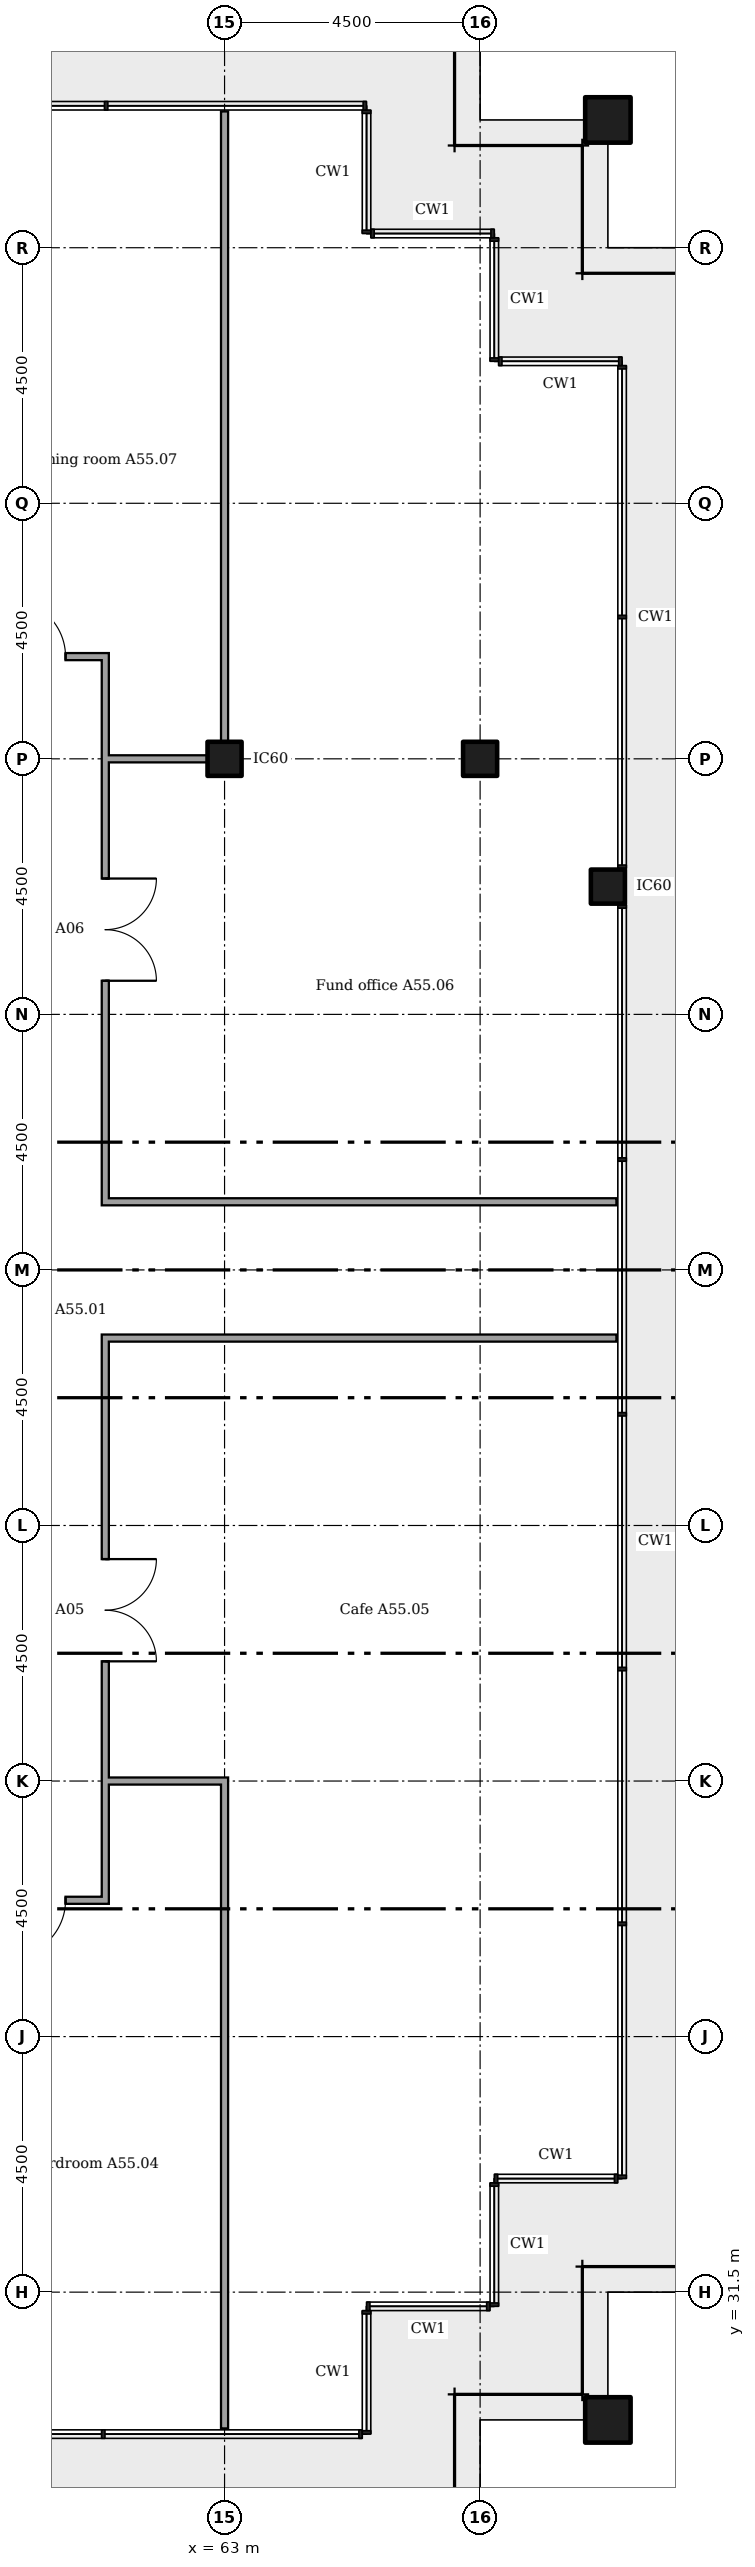
"""IFC4 building model, lengths in metres.
Left out: names, types, materials, properties, quantities, classifications, styles, units other than length and angle.
Written with IfcOpenShell. Run it as: python <this file> out.ifc"""

import sys

from ifc_helpers import new_model, si_unit, direction, frame, frame_2d, origin, origin_2d, place, context, subcontext, project, spatial, rectangle, extrude, element, fill, save


model = new_model("IFC4")
c1 = context("Model", 3, precision=1e-05, world=origin(), true_north=direction((0.0, 1.0)))
c2 = subcontext(c1, "Body", "Model", "MODEL_VIEW")
j1 = project(units=[si_unit("LENGTHUNIT", "METRE"), si_unit("PLANEANGLEUNIT", "RADIAN")], contexts=[c1])
p1 = place(None, origin())
s1 = spatial("IfcSite", under=j1, at=p1, CompositionType="ELEMENT")
p2 = place(p1, origin())
s2 = spatial("IfcBuilding", under=s1, at=p2, CompositionType="ELEMENT")
p3 = place(p2, frame((0.0, 0.0, 217.2)))
s3 = spatial("IfcBuildingStorey", under=s2, at=p3, CompositionType="ELEMENT", Elevation=217.2)
for number, where in (
    (1, (69.75, 29.25, 0.0)),
    (2, (69.75, 69.75, 0.0)),
):
    element("IfcColumn", number, at=place(p3, frame(where)), inside=s3, PredefinedType="COLUMN", context=c2, shape_type="SweptSolid", body=[
        extrude(rectangle(XDim=0.8, YDim=0.8, at=origin_2d()), origin(), (0.0, 0.0, 1.0), 3.6),
    ])
for number, where in (
    (3, (63.0, 58.5, 0.0)),
    (4, (67.5, 58.5, 0.0)),
    (5, (69.75, 56.25, 0.0)),
):
    element("IfcColumn", number, at=place(p3, frame(where)), inside=s3, PredefinedType="COLUMN", context=c2, shape_type="SweptSolid", body=[
        extrude(rectangle(XDim=0.6, YDim=0.6, at=origin_2d()), origin(), (0.0, 0.0, 1.0), 3.6),
    ])
p4 = place(p3, frame((42.5, 38.4, 0.0)))
e6 = element("IfcWall", 6, at=p4, inside=s3, PredefinedType="PARTITIONING", context=c2, shape_type="SweptSolid", body=[
    extrude(rectangle(XDim=18.462, YDim=0.125, at=frame_2d((9.231, 0.0))), origin(), (0.0, 0.0, 1.0), 3.45),
])
p5 = place(p4, frame((0.35, 0.0, 0.0)))
e7 = element("IfcOpeningElement", 7, at=p5, cuts=e6, PredefinedType="OPENING", context=c2, shape_type="SweptSolid", body=[
    extrude(rectangle(XDim=1.8, YDim=2.1, at=frame_2d((0.9, 1.05))), frame((0.0, 0.073, 0.0), z_axis=(0.0, -1.0, 0.0), x_axis=(1.0, 0.0, 0.0)), (0.0, 0.0, 1.0), 0.145),
])
p6 = place(p4, frame((5.258, 0.0, 0.0)))
e8 = element("IfcOpeningElement", 8, at=p6, cuts=e6, PredefinedType="OPENING", context=c2, shape_type="SweptSolid", body=[
    extrude(rectangle(XDim=1.0, YDim=2.1, at=frame_2d((0.5, 1.05))), frame((0.0, 0.073, 0.0), z_axis=(0.0, -1.0, 0.0), x_axis=(1.0, 0.0, 0.0)), (0.0, 0.0, 1.0), 0.145),
])
p7 = place(p4, frame((13.705, 0.0, 0.0)))
e9 = element("IfcOpeningElement", 9, at=p7, cuts=e6, PredefinedType="OPENING", context=c2, shape_type="SweptSolid", body=[
    extrude(rectangle(XDim=1.0, YDim=2.1, at=frame_2d((0.5, 1.05))), frame((0.0, 0.073, 0.0), z_axis=(0.0, -1.0, 0.0), x_axis=(1.0, 0.0, 0.0)), (0.0, 0.0, 1.0), 0.145),
])
p8 = place(p4, frame((16.7, 0.0, 0.0)))
e10 = element("IfcOpeningElement", 10, at=p8, cuts=e6, PredefinedType="OPENING", context=c2, shape_type="SweptSolid", body=[
    extrude(rectangle(XDim=1.0, YDim=2.1, at=frame_2d((0.5, 1.05))), frame((0.0, 0.073, 0.0), z_axis=(0.0, -1.0, 0.0), x_axis=(1.0, 0.0, 0.0)), (0.0, 0.0, 1.0), 0.145),
])
p9 = place(p3, frame((60.9, 40.5, 0.0)))
e11 = element("IfcWall", 11, at=p9, inside=s3, PredefinedType="PARTITIONING", context=c2, shape_type="SweptSolid", body=[
    extrude(rectangle(XDim=2.163, YDim=0.125, at=frame_2d((1.081, 0.0))), origin(), (0.0, 0.0, 1.0), 2.772),
])
for number, where in (
    (12, (60.837, 48.3, 0.0)),
    (13, (60.837, 50.7, 0.0)),
):
    element("IfcWall", number, at=place(p3, frame(where)), inside=s3, PredefinedType="PARTITIONING", context=c2, shape_type="SweptSolid", body=[
        extrude(rectangle(XDim=9.062, YDim=0.125, at=frame_2d((4.531, 0.0))), origin(), (0.0, 0.0, 1.0), 3.45),
    ])
p10 = place(p3, frame((60.9, 58.5, 0.0)))
e14 = element("IfcWall", 14, at=p10, inside=s3, PredefinedType="PARTITIONING", context=c2, shape_type="SweptSolid", body=[
    extrude(rectangle(XDim=2.163, YDim=0.125, at=frame_2d((1.081, 0.0))), origin(), (0.0, 0.0, 1.0), 2.676),
])
p11 = place(p3, frame((42.6, 60.3, 0.0)))
e15 = element("IfcWall", 15, at=p11, inside=s3, PredefinedType="PARTITIONING", context=c2, shape_type="SweptSolid", body=[
    extrude(rectangle(XDim=18.362, YDim=0.125, at=frame_2d((9.181, 0.0))), origin(), (0.0, 0.0, 1.0), 3.45),
])
p12 = place(p11, frame((16.6, 0.0, 0.0)))
e16 = element("IfcOpeningElement", 16, at=p12, cuts=e15, PredefinedType="OPENING", context=c2, shape_type="SweptSolid", body=[
    extrude(rectangle(XDim=1.0, YDim=2.1, at=frame_2d((0.5, 1.05))), frame((0.0, 0.073, 0.0), z_axis=(0.0, -1.0, 0.0), x_axis=(1.0, 0.0, 0.0)), (0.0, 0.0, 1.0), 0.145),
])
p13 = place(p11, frame((12.695, 0.0, 0.0)))
e17 = element("IfcOpeningElement", 17, at=p13, cuts=e15, PredefinedType="OPENING", context=c2, shape_type="SweptSolid", body=[
    extrude(rectangle(XDim=1.0, YDim=2.1, at=frame_2d((0.5, 1.05))), frame((0.0, 0.073, 0.0), z_axis=(0.0, -1.0, 0.0), x_axis=(1.0, 0.0, 0.0)), (0.0, 0.0, 1.0), 0.145),
])
p14 = place(p11, frame((9.105, 0.0, 0.0)))
e18 = element("IfcOpeningElement", 18, at=p14, cuts=e15, PredefinedType="OPENING", context=c2, shape_type="SweptSolid", body=[
    extrude(rectangle(XDim=1.0, YDim=2.1, at=frame_2d((0.5, 1.05))), frame((0.0, 0.073, 0.0), z_axis=(0.0, -1.0, 0.0), x_axis=(1.0, 0.0, 0.0)), (0.0, 0.0, 1.0), 0.145),
])
p15 = place(p11, frame((2.95, 0.0, 0.0)))
e19 = element("IfcOpeningElement", 19, at=p15, cuts=e15, PredefinedType="OPENING", context=c2, shape_type="SweptSolid", body=[
    extrude(rectangle(XDim=1.0, YDim=2.1, at=frame_2d((0.5, 1.05))), frame((0.0, 0.073, 0.0), z_axis=(0.0, -1.0, 0.0), x_axis=(1.0, 0.0, 0.0)), (0.0, 0.0, 1.0), 0.145),
])
p16 = place(p3, frame((60.9, 38.462, 0.0), z_axis=(0.0, 0.0, 1.0), x_axis=(0.0, 1.0, 0.0)))
e20 = element("IfcWall", 20, at=p16, inside=s3, PredefinedType="PARTITIONING", context=c2, shape_type="SweptSolid", body=[
    extrude(rectangle(XDim=9.775, YDim=0.125, at=frame_2d((4.888, 0.0))), origin(), (0.0, 0.0, 1.0), 3.45),
])
p17 = place(p16, frame((4.146, 0.0, 0.0)))
e21 = element("IfcOpeningElement", 21, at=p17, cuts=e20, PredefinedType="OPENING", context=c2, shape_type="SweptSolid", body=[
    extrude(rectangle(XDim=1.8, YDim=2.1, at=frame_2d((0.9, 1.05))), frame((0.0, 0.073, 0.0), z_axis=(0.0, -1.0, 0.0), x_axis=(1.0, 0.0, 0.0)), (0.0, 0.0, 1.0), 0.145),
])
p18 = place(p3, frame((60.9, 50.762, 0.0), z_axis=(0.0, 0.0, 1.0), x_axis=(0.0, 1.0, 0.0)))
e22 = element("IfcWall", 22, at=p18, inside=s3, PredefinedType="PARTITIONING", context=c2, shape_type="SweptSolid", body=[
    extrude(rectangle(XDim=9.475, YDim=0.125, at=frame_2d((4.738, 0.0))), origin(), (0.0, 0.0, 1.0), 3.45),
])
p19 = place(p18, frame((3.83, 0.0, 0.0)))
e23 = element("IfcOpeningElement", 23, at=p19, cuts=e22, PredefinedType="OPENING", context=c2, shape_type="SweptSolid", body=[
    extrude(rectangle(XDim=1.8, YDim=2.1, at=frame_2d((0.9, 1.05))), frame((0.0, 0.073, 0.0), z_axis=(0.0, -1.0, 0.0), x_axis=(1.0, 0.0, 0.0)), (0.0, 0.0, 1.0), 0.145),
])
p20 = place(p3, frame((63.0, 29.1, 0.0), z_axis=(0.0, 0.0, 1.0), x_axis=(0.0, 1.0, 0.0)))
e24 = element("IfcWall", 24, at=p20, inside=s3, PredefinedType="PARTITIONING", context=c2, shape_type="SweptSolid", body=[
    extrude(rectangle(XDim=11.337, YDim=0.125, at=frame_2d((5.669, 0.0))), origin(), (0.0, 0.0, 1.0), 3.45),
])
p21 = place(p3, frame((63.0, 58.562, 0.0), z_axis=(0.0, 0.0, 1.0), x_axis=(0.0, 1.0, 0.0)))
e25 = element("IfcWall", 25, at=p21, inside=s3, PredefinedType="PARTITIONING", context=c2, shape_type="SweptSolid", body=[
    extrude(rectangle(XDim=11.337, YDim=0.125, at=frame_2d((5.669, 0.0))), origin(), (0.0, 0.0, 1.0), 2.772),
])
p22 = place(p8, frame((1.0, 0.0, 0.0), x_axis=(-1.0, 0.0, 0.0)))
e26 = element("IfcDoor", 26, at=p22, inside=s3, OperationType="SINGLE_SWING_LEFT", PredefinedType="DOOR", context=c2, shape_type="SweptSolid", body=[
    extrude(rectangle(XDim=1.0, YDim=2.1, at=frame_2d((0.5, 1.05))), frame((0.0, 0.025, 0.0), z_axis=(0.0, -1.0, 0.0), x_axis=(1.0, 0.0, 0.0)), (0.0, 0.0, 1.0), 0.05),
])
fill(e10, e26)
p23 = place(p17, frame((1.8, 0.0, 0.0), x_axis=(-1.0, 0.0, 0.0)))
e27 = element("IfcDoor", 27, at=p23, inside=s3, OperationType="DOUBLE_DOOR_SINGLE_SWING", PredefinedType="DOOR", context=c2, shape_type="SweptSolid", body=[
    extrude(rectangle(XDim=1.8, YDim=2.1, at=frame_2d((0.9, 1.05))), frame((0.0, 0.025, 0.0), z_axis=(0.0, -1.0, 0.0), x_axis=(1.0, 0.0, 0.0)), (0.0, 0.0, 1.0), 0.05),
])
fill(e21, e27)
p24 = place(p19, frame((1.8, 0.0, 0.0), x_axis=(-1.0, 0.0, 0.0)))
e28 = element("IfcDoor", 28, at=p24, inside=s3, OperationType="DOUBLE_DOOR_SINGLE_SWING", PredefinedType="DOOR", context=c2, shape_type="SweptSolid", body=[
    extrude(rectangle(XDim=1.8, YDim=2.1, at=frame_2d((0.9, 1.05))), frame((0.0, 0.025, 0.0), z_axis=(0.0, -1.0, 0.0), x_axis=(1.0, 0.0, 0.0)), (0.0, 0.0, 1.0), 0.05),
])
fill(e23, e28)
p25 = place(p12, origin())
e29 = element("IfcDoor", 29, at=p25, inside=s3, OperationType="SINGLE_SWING_RIGHT", PredefinedType="DOOR", context=c2, shape_type="SweptSolid", body=[
    extrude(rectangle(XDim=1.0, YDim=2.1, at=frame_2d((0.5, 1.05))), frame((0.0, 0.025, 0.0), z_axis=(0.0, -1.0, 0.0), x_axis=(1.0, 0.0, 0.0)), (0.0, 0.0, 1.0), 0.05),
])
fill(e16, e29)
save(model, sys.argv[1])
